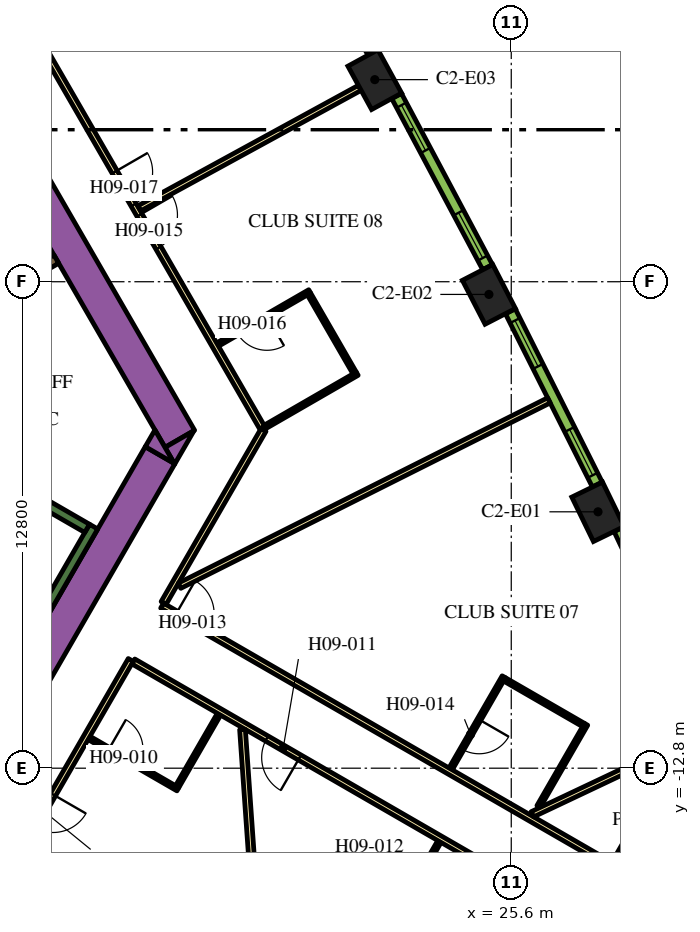
"""IFC4 building model, lengths in metres.
Left out: names, types, materials, properties, quantities, classifications, styles, units other than length and angle.
Written with IfcOpenShell. Run it as: python <this file> out.ifc"""

import sys

from ifc_helpers import new_model, si_unit, direction, frame, frame_2d, origin, origin_2d, place, context, subcontext, project, spatial, polyline, rectangle, outline, extrude, element, fill, save


model = new_model("IFC4")
c1 = context("Model", 3, precision=1e-05, world=origin(), true_north=direction((0.0, 1.0)))
c2 = subcontext(c1, "Body", "Model", "MODEL_VIEW")
j1 = project(units=[si_unit("LENGTHUNIT", "METRE"), si_unit("PLANEANGLEUNIT", "RADIAN")], contexts=[c1])
p1 = place(None, origin())
s1 = spatial("IfcSite", under=j1, at=p1, CompositionType="ELEMENT")
p2 = place(p1, origin())
s2 = spatial("IfcBuilding", under=s1, at=p2, CompositionType="ELEMENT")
p3 = place(p2, frame((0.0, 0.0, 118.8)))
s3 = spatial("IfcBuildingStorey", under=s2, at=p3, CompositionType="ELEMENT", Elevation=118.8)
p4 = place(p3, frame((29.097, -16.799, 0.0), z_axis=(0.0, 0.0, 1.0), x_axis=(0.866025403784, -0.5, 0.0)))
e1 = element("IfcColumn", 1, at=p4, inside=s3, PredefinedType="COLUMN", context=c2, shape_type="SweptSolid", body=[
    extrude(rectangle(XDim=3.0, YDim=3.0, at=origin_2d()), origin(), (0.0, 0.0, 1.0), 3.9),
])
for number, where, z_axis, x_axis in (
    (2, (27.883, -6.054, 0.0), (0.0, 0.0, 1.0), (-0.438, 0.899, 0.0)),
    (3, (25.012, -0.334, 0.0), (0.0, 0.0, 1.0), (-0.459, 0.888, 0.0)),
    (4, (22.009, 5.317, 0.0), (0.0, 0.0, 1.0), (-0.48, 0.877, 0.0)),
):
    element("IfcColumn", number, at=place(p3, frame(where, z_axis=z_axis, x_axis=x_axis)), inside=s3, PredefinedType="COLUMN", context=c2, shape_type="SweptSolid", body=[
        extrude(rectangle(XDim=1.3, YDim=0.9, at=origin_2d()), origin(), (0.0, 0.0, 1.0), 3.9),
    ])
p5 = place(p3, frame((6.776, 13.364, 0.0), z_axis=(0.0, 0.0, 1.0), x_axis=(0.500004177138, -0.8660229921, 0.0)))
e5 = element("IfcWall", 5, at=p5, inside=s3, PredefinedType="SOLIDWALL", context=c2, shape_type="SweptSolid", body=[
    extrude(rectangle(XDim=20.204, YDim=0.9, at=frame_2d((10.102, 0.0))), origin(), (0.0, 0.0, 1.0), 3.9),
])
p6 = place(p3, origin())
e6 = element("IfcWall", 6, at=p6, inside=s3, PredefinedType="SOLIDWALL", context=c2, shape_type="SweptSolid", body=[
    extrude(outline(polyline([(16.743, -4.8), (16.489, -4.36), (17.251, -3.92), (16.743, -4.8)])), origin(), (0.0, 0.0, 1.0), 3.9),
])
p7 = place(p3, frame((11.943, -12.214, 0.0), z_axis=(0.0, 0.0, 1.0), x_axis=(0.49998092645, 0.866036415623, 0.0)))
e7 = element("IfcWall", 7, at=p7, inside=s3, PredefinedType="SOLIDWALL", context=c2, shape_type="SweptSolid", body=[
    extrude(rectangle(XDim=8.83, YDim=0.9, at=frame_2d((4.415, 0.0))), origin(), (0.0, 0.0, 1.0), 3.9),
])
e8 = element("IfcWall", 8, at=p6, inside=s3, PredefinedType="SOLIDWALL", context=c2, shape_type="SweptSolid", body=[
    extrude(outline(polyline([(16.223, -3.9), (16.732, -4.78), (15.969, -4.34), (16.223, -3.9)])), origin(), (0.0, 0.0, 1.0), 3.9),
])
p8 = place(p3, frame((12.885, -9.431, 0.0), z_axis=(0.0, 0.0, 1.0), x_axis=(0.500020560727, 0.866013532718, 0.0)))
e9 = element("IfcWall", 9, at=p8, inside=s3, PredefinedType="SOLIDWALL", context=c2, shape_type="SweptSolid", body=[
    extrude(rectangle(XDim=3.45, YDim=0.25, at=frame_2d((1.725, 0.0))), origin(), (0.0, 0.0, 1.0), 3.9),
])
p9 = place(p3, frame((8.334, -2.964, 0.0), z_axis=(0.0, 0.0, 1.0), x_axis=(0.866016039709, -0.500016218704, 0.0)))
e10 = element("IfcWall", 10, at=p9, inside=s3, PredefinedType="SOLIDWALL", context=c2, shape_type="SweptSolid", body=[
    extrude(rectangle(XDim=7.05, YDim=0.25, at=frame_2d((3.525, 0.0))), origin(), (0.0, 0.0, 1.0), 3.9),
])
p10 = place(p3, frame((13.629, 0.594, 0.0), z_axis=(0.0, 0.0, 1.0), x_axis=(-0.86602790099, -0.499995674689, 0.0)))
e11 = element("IfcWall", 11, at=p10, inside=s3, PredefinedType="SOLIDWALL", context=c2, shape_type="SweptSolid", body=[
    extrude(rectangle(XDim=3.146, YDim=0.25, at=frame_2d((1.573, 0.0))), origin(), (0.0, 0.0, 1.0), 3.9),
])
p11 = place(p3, frame((16.412, -8.523, 0.0), z_axis=(0.0, 0.0, 1.0), x_axis=(0.866025629663, -0.499999608766, 0.0)))
e12 = element("IfcWall", 12, at=p11, inside=s3, PredefinedType="PARTITIONING", context=c2, shape_type="SweptSolid", body=[
    extrude(rectangle(XDim=13.624, YDim=0.15, at=frame_2d((6.812, 0.0))), origin(), (0.0, 0.0, 1.0), 2.75),
])
p12 = place(p11, frame((0.426, 0.0, 0.0)))
e13 = element("IfcOpeningElement", 13, at=p12, cuts=e12, PredefinedType="OPENING", context=c2, shape_type="SweptSolid", body=[
    extrude(rectangle(XDim=1.0, YDim=2.1, at=frame_2d((0.5, 1.05))), frame((0.0, 0.085, 0.0), z_axis=(0.0, -1.0, 0.0), x_axis=(1.0, 0.0, 0.0)), (0.0, 0.0, 1.0), 0.17),
])
p13 = place(p3, frame((19.081, -3.9, 0.0), z_axis=(0.0, 0.0, 1.0), x_axis=(-0.499974327079, -0.866040225545, 0.0)))
e14 = element("IfcWall", 14, at=p13, inside=s3, PredefinedType="PARTITIONING", context=c2, shape_type="SweptSolid", body=[
    extrude(rectangle(XDim=5.258, YDim=0.15, at=frame_2d((2.629, 0.0))), origin(), (0.0, 0.0, 1.0), 2.75),
])
p14 = place(p3, frame((6.163, 18.475, 0.0), z_axis=(0.0, 0.0, 1.0), x_axis=(0.500001317485, -0.866024643133, 0.0)))
e15 = element("IfcWall", 15, at=p14, inside=s3, PredefinedType="PARTITIONING", context=c2, shape_type="SweptSolid", body=[
    extrude(rectangle(XDim=25.767, YDim=0.15, at=frame_2d((12.883, 0.0))), origin(), (0.0, 0.0, 1.0), 2.75),
])
p15 = place(p14, frame((19.306, 0.0, 0.0)))
e16 = element("IfcOpeningElement", 16, at=p15, cuts=e15, PredefinedType="OPENING", context=c2, shape_type="SweptSolid", body=[
    extrude(rectangle(XDim=1.0, YDim=2.1, at=frame_2d((0.5, 1.05))), frame((0.0, 0.085, 0.0), z_axis=(0.0, -1.0, 0.0), x_axis=(1.0, 0.0, 0.0)), (0.0, 0.0, 1.0), 0.17),
])
p16 = place(p14, frame((17.999, 0.0, 0.0)))
e17 = element("IfcOpeningElement", 17, at=p16, cuts=e15, PredefinedType="OPENING", context=c2, shape_type="SweptSolid", body=[
    extrude(rectangle(XDim=1.0, YDim=2.1, at=frame_2d((0.5, 1.05))), frame((0.0, 0.085, 0.0), z_axis=(0.0, -1.0, 0.0), x_axis=(1.0, 0.0, 0.0)), (0.0, 0.0, 1.0), 0.17),
])
p17 = place(p14, frame((0.596, 0.0, 0.0)))
e18 = element("IfcOpeningElement", 18, at=p17, cuts=e15, PredefinedType="OPENING", context=c2, shape_type="SweptSolid", body=[
    extrude(rectangle(XDim=1.0, YDim=2.1, at=frame_2d((0.5, 1.05))), frame((0.0, 0.085, 0.0), z_axis=(0.0, -1.0, 0.0), x_axis=(1.0, 0.0, 0.0)), (0.0, 0.0, 1.0), 0.17),
])
p18 = place(p3, frame((15.587, -9.952, 0.0), z_axis=(0.0, 0.0, 1.0), x_axis=(-0.500016618951, -0.866015808616, 0.0)))
e19 = element("IfcWall", 19, at=p18, inside=s3, PredefinedType="PARTITIONING", context=c2, shape_type="SweptSolid", body=[
    extrude(rectangle(XDim=5.268, YDim=0.15, at=frame_2d((2.634, 0.0))), origin(), (0.0, 0.0, 1.0), 2.75),
])
p19 = place(p18, frame((4.088, 0.0, 0.0)))
e20 = element("IfcOpeningElement", 20, at=p19, cuts=e19, PredefinedType="OPENING", context=c2, shape_type="SweptSolid", body=[
    extrude(rectangle(XDim=1.0, YDim=2.1, at=frame_2d((0.5, 1.05))), frame((0.0, 0.085, 0.0), z_axis=(0.0, -1.0, 0.0), x_axis=(1.0, 0.0, 0.0)), (0.0, 0.0, 1.0), 0.17),
])
p20 = place(p3, frame((27.386, -16.764, 0.0), z_axis=(0.0, 0.0, 1.0), x_axis=(-0.866022585856, 0.500004880763, 0.0)))
e21 = element("IfcWall", 21, at=p20, inside=s3, PredefinedType="PARTITIONING", context=c2, shape_type="SweptSolid", body=[
    extrude(rectangle(XDim=13.544, YDim=0.15, at=frame_2d((6.772, 0.0))), origin(), (0.0, 0.0, 1.0), 2.75),
])
p21 = place(p20, frame((8.491, 0.0, 0.0)))
e22 = element("IfcOpeningElement", 22, at=p21, cuts=e21, PredefinedType="OPENING", context=c2, shape_type="SweptSolid", body=[
    extrude(rectangle(XDim=1.0, YDim=2.1, at=frame_2d((0.5, 1.05))), frame((0.0, 0.085, 0.0), z_axis=(0.0, -1.0, 0.0), x_axis=(1.0, 0.0, 0.0)), (0.0, 0.0, 1.0), 0.17),
])
p22 = place(p3, frame((21.614, 5.102, 0.0), z_axis=(0.0, 0.0, 1.0), x_axis=(-0.877484555087, -0.479604895287, 0.0)))
e23 = element("IfcWall", 23, at=p22, inside=s3, PredefinedType="PARTITIONING", context=c2, shape_type="SweptSolid", body=[
    extrude(rectangle(XDim=6.611, YDim=0.15, at=frame_2d((3.306, 0.0))), origin(), (0.0, 0.0, 1.0), 2.75),
])
p23 = place(p3, frame((26.591, -3.122, 0.0), z_axis=(0.0, 0.0, 1.0), x_axis=(-0.893766213273, -0.448533115847, 0.0)))
e24 = element("IfcWall", 24, at=p23, inside=s3, PredefinedType="PARTITIONING", context=c2, shape_type="SweptSolid", body=[
    extrude(rectangle(XDim=10.875, YDim=0.15, at=frame_2d((5.438, 0.0))), origin(), (0.0, 0.0, 1.0), 2.75),
])
p24 = place(p3, frame((19.153, -20.671, 0.0), z_axis=(0.0, 0.0, 1.0), x_axis=(-0.070070736723, 0.997542025107, 0.0)))
e25 = element("IfcWall", 25, at=p24, inside=s3, PredefinedType="PARTITIONING", context=c2, shape_type="SweptSolid", body=[
    extrude(rectangle(XDim=8.909, YDim=0.15, at=frame_2d((4.455, 0.0))), origin(), (0.0, 0.0, 1.0), 2.75),
])
p25 = place(p3, frame((30.231, -12.085, 0.0), z_axis=(0.0, 0.0, 1.0), x_axis=(-0.904001132572, -0.427530060122, 0.0)))
e26 = element("IfcWall", 26, at=p25, inside=s3, PredefinedType="PARTITIONING", context=c2, shape_type="SweptSolid", body=[
    extrude(rectangle(XDim=4.51, YDim=0.15, at=frame_2d((2.255, 0.0))), origin(), (0.0, 0.0, 1.0), 2.75),
])
p26 = place(p3, frame((14.49, -12.003, 0.0), z_axis=(0.0, 0.0, 1.0), x_axis=(0.866059108428, -0.4999416173, 0.0)))
e27 = element("IfcWall", 27, at=p26, inside=s3, PredefinedType="PARTITIONING", context=c2, shape_type="SweptSolid", body=[
    extrude(rectangle(XDim=2.7, YDim=0.1, at=frame_2d((1.35, 0.0))), origin(), (0.0, 0.0, 1.0), 2.75),
])
p27 = place(p26, frame((0.6, 0.0, 0.0)))
e28 = element("IfcOpeningElement", 28, at=p27, cuts=e27, PredefinedType="OPENING", context=c2, shape_type="SweptSolid", body=[
    extrude(rectangle(XDim=0.9, YDim=2.1, at=frame_2d((0.45, 1.05))), frame((0.0, 0.06, 0.0), z_axis=(0.0, -1.0, 0.0), x_axis=(1.0, 0.0, 0.0)), (0.0, 0.0, 1.0), 0.12),
])
p28 = place(p3, frame((16.81, -13.285, 0.0), z_axis=(0.0, 0.0, 1.0), x_axis=(0.499994660107, 0.866028486751, 0.0)))
e29 = element("IfcWall", 29, at=p28, inside=s3, PredefinedType="PARTITIONING", context=c2, shape_type="SweptSolid", body=[
    extrude(rectangle(XDim=2.2, YDim=0.1, at=frame_2d((1.1, 0.0))), origin(), (0.0, 0.0, 1.0), 2.75),
])
p29 = place(p3, frame((23.71, -14.728, 0.0), z_axis=(0.0, 0.0, 1.0), x_axis=(-0.500006934395, -0.866021400173, 0.0)))
e30 = element("IfcWall", 30, at=p29, inside=s3, PredefinedType="PARTITIONING", context=c2, shape_type="SweptSolid", body=[
    extrude(rectangle(XDim=2.6, YDim=0.1, at=frame_2d((1.3, 0.0))), origin(), (0.0, 0.0, 1.0), 2.75),
])
p30 = place(p29, frame((0.6, 0.0, 0.0)))
e31 = element("IfcOpeningElement", 31, at=p30, cuts=e30, PredefinedType="OPENING", context=c2, shape_type="SweptSolid", body=[
    extrude(rectangle(XDim=0.9, YDim=2.1, at=frame_2d((0.45, 1.05))), frame((0.0, 0.06, 0.0), z_axis=(0.0, -1.0, 0.0), x_axis=(1.0, 0.0, 0.0)), (0.0, 0.0, 1.0), 0.12),
])
p31 = place(p3, frame((25.404, -10.395, 0.0), z_axis=(0.0, 0.0, 1.0), x_axis=(-0.49998411664, -0.866034573852, 0.0)))
e32 = element("IfcWall", 32, at=p31, inside=s3, PredefinedType="PARTITIONING", context=c2, shape_type="SweptSolid", body=[
    extrude(rectangle(XDim=2.8, YDim=0.1, at=frame_2d((1.4, 0.0))), origin(), (0.0, 0.0, 1.0), 2.75),
])
p32 = place(p31, frame((1.3, 0.0, 0.0)))
e33 = element("IfcOpeningElement", 33, at=p32, cuts=e32, PredefinedType="OPENING", context=c2, shape_type="SweptSolid", body=[
    extrude(rectangle(XDim=0.9, YDim=2.1, at=frame_2d((0.45, 1.05))), frame((0.0, 0.06, 0.0), z_axis=(0.0, -1.0, 0.0), x_axis=(1.0, 0.0, 0.0)), (0.0, 0.0, 1.0), 0.12),
])
p33 = place(p3, frame((25.422, -10.463, 0.0), z_axis=(0.0, 0.0, 1.0), x_axis=(0.866024647952, -0.500001309137, 0.0)))
e34 = element("IfcWall", 34, at=p33, inside=s3, PredefinedType="PARTITIONING", context=c2, shape_type="SweptSolid", body=[
    extrude(rectangle(XDim=2.4, YDim=0.1, at=frame_2d((1.2, 0.0))), origin(), (0.0, 0.0, 1.0), 2.75),
])
p34 = place(p3, frame((26.319, -13.81, 0.0), z_axis=(0.0, 0.0, 1.0), x_axis=(0.500004234368, 0.866022959057, 0.0)))
e35 = element("IfcWall", 35, at=p34, inside=s3, PredefinedType="PARTITIONING", context=c2, shape_type="SweptSolid", body=[
    extrude(rectangle(XDim=2.5, YDim=0.1, at=frame_2d((1.25, 0.0))), origin(), (0.0, 0.0, 1.0), 2.75),
])
p35 = place(p3, frame((20.296, -0.254, 0.0), z_axis=(0.0, 0.0, 1.0), x_axis=(-0.866034573852, -0.49998411664, 0.0)))
e36 = element("IfcWall", 36, at=p35, inside=s3, PredefinedType="PARTITIONING", context=c2, shape_type="SweptSolid", body=[
    extrude(rectangle(XDim=2.8, YDim=0.1, at=frame_2d((1.4, 0.0))), origin(), (0.0, 0.0, 1.0), 2.75),
])
p36 = place(p35, frame((1.3, 0.0, 0.0)))
e37 = element("IfcOpeningElement", 37, at=p36, cuts=e36, PredefinedType="OPENING", context=c2, shape_type="SweptSolid", body=[
    extrude(rectangle(XDim=0.9, YDim=2.1, at=frame_2d((0.45, 1.05))), frame((0.0, 0.06, 0.0), z_axis=(0.0, -1.0, 0.0), x_axis=(1.0, 0.0, 0.0)), (0.0, 0.0, 1.0), 0.12),
])
p37 = place(p3, frame((20.278, -0.323, 0.0), z_axis=(0.0, 0.0, 1.0), x_axis=(0.500001309137, -0.866024647952, 0.0)))
e38 = element("IfcWall", 38, at=p37, inside=s3, PredefinedType="PARTITIONING", context=c2, shape_type="SweptSolid", body=[
    extrude(rectangle(XDim=2.4, YDim=0.1, at=frame_2d((1.2, 0.0))), origin(), (0.0, 0.0, 1.0), 2.75),
])
p38 = place(p3, frame((19.121, -3.819, 0.0), z_axis=(0.0, 0.0, 1.0), x_axis=(0.866034573852, 0.49998411664, 0.0)))
e39 = element("IfcWall", 39, at=p38, inside=s3, PredefinedType="PARTITIONING", context=c2, shape_type="SweptSolid", body=[
    extrude(rectangle(XDim=2.8, YDim=0.1, at=frame_2d((1.4, 0.0))), origin(), (0.0, 0.0, 1.0), 2.75),
])
p39 = place(p3, frame((30.62, -11.127, 0.0), z_axis=(0.0, 0.0, 1.0), x_axis=(-0.427543726596, 0.903994669148, 0.0)))
e40 = element("IfcWall", 40, at=p39, inside=s3, PredefinedType="SOLIDWALL", context=c2, shape_type="SweptSolid", body=[
    extrude(rectangle(XDim=5.107, YDim=0.29, at=frame_2d((2.553, 0.0))), origin(), (0.0, 0.0, 1.0), 3.65),
])
p40 = place(p39, frame((0.24, 0.0, 0.9)))
e41 = element("IfcOpeningElement", 41, at=p40, cuts=e40, PredefinedType="OPENING", context=c2, shape_type="SweptSolid", body=[
    extrude(rectangle(XDim=1.35, YDim=2.15, at=frame_2d((0.675, 1.075))), frame((0.0, 0.155, 0.0), z_axis=(0.0, -1.0, 0.0), x_axis=(1.0, 0.0, 0.0)), (0.0, 0.0, 1.0), 0.31),
])
p41 = place(p39, frame((3.471, 0.0, 0.9)))
e42 = element("IfcOpeningElement", 42, at=p41, cuts=e40, PredefinedType="OPENING", context=c2, shape_type="SweptSolid", body=[
    extrude(rectangle(XDim=1.35, YDim=2.15, at=frame_2d((0.675, 1.075))), frame((0.0, 0.155, 0.0), z_axis=(0.0, -1.0, 0.0), x_axis=(1.0, 0.0, 0.0)), (0.0, 0.0, 1.0), 0.31),
])
p42 = place(p3, frame((27.864, -5.336, 0.0), z_axis=(0.0, 0.0, 1.0), x_axis=(-0.448534297211, 0.893765620409, 0.0)))
e43 = element("IfcWall", 43, at=p42, inside=s3, PredefinedType="SOLIDWALL", context=c2, shape_type="SweptSolid", body=[
    extrude(rectangle(XDim=5.1, YDim=0.29, at=frame_2d((2.55, 0.0))), origin(), (0.0, 0.0, 1.0), 3.65),
])
p43 = place(p42, frame((0.272, 0.0, 0.9)))
e44 = element("IfcOpeningElement", 44, at=p43, cuts=e43, PredefinedType="OPENING", context=c2, shape_type="SweptSolid", body=[
    extrude(rectangle(XDim=1.35, YDim=2.15, at=frame_2d((0.675, 1.075))), frame((0.0, 0.155, 0.0), z_axis=(0.0, -1.0, 0.0), x_axis=(1.0, 0.0, 0.0)), (0.0, 0.0, 1.0), 0.31),
])
p44 = place(p42, frame((3.478, 0.0, 0.9)))
e45 = element("IfcOpeningElement", 45, at=p44, cuts=e43, PredefinedType="OPENING", context=c2, shape_type="SweptSolid", body=[
    extrude(rectangle(XDim=1.35, YDim=2.15, at=frame_2d((0.675, 1.075))), frame((0.0, 0.155, 0.0), z_axis=(0.0, -1.0, 0.0), x_axis=(1.0, 0.0, 0.0)), (0.0, 0.0, 1.0), 0.31),
])
p45 = place(p3, frame((24.977, 0.383, 0.0), z_axis=(0.0, 0.0, 1.0), x_axis=(-0.469323203119, 0.883026461106, 0.0)))
e46 = element("IfcWall", 46, at=p45, inside=s3, PredefinedType="SOLIDWALL", context=c2, shape_type="SweptSolid", body=[
    extrude(rectangle(XDim=5.101, YDim=0.29, at=frame_2d((2.55, 0.0))), origin(), (0.0, 0.0, 1.0), 3.65),
])
p46 = place(p45, frame((0.273, 0.0, 0.9)))
e47 = element("IfcOpeningElement", 47, at=p46, cuts=e46, PredefinedType="OPENING", context=c2, shape_type="SweptSolid", body=[
    extrude(rectangle(XDim=1.35, YDim=2.15, at=frame_2d((0.675, 1.075))), frame((0.0, 0.155, 0.0), z_axis=(0.0, -1.0, 0.0), x_axis=(1.0, 0.0, 0.0)), (0.0, 0.0, 1.0), 0.31),
])
p47 = place(p45, frame((3.478, 0.0, 0.9)))
e48 = element("IfcOpeningElement", 48, at=p47, cuts=e46, PredefinedType="OPENING", context=c2, shape_type="SweptSolid", body=[
    extrude(rectangle(XDim=1.35, YDim=2.15, at=frame_2d((0.675, 1.075))), frame((0.0, 0.155, 0.0), z_axis=(0.0, -1.0, 0.0), x_axis=(1.0, 0.0, 0.0)), (0.0, 0.0, 1.0), 0.31),
])
p48 = place(p3, frame((21.956, 6.033, 0.0), z_axis=(0.0, 0.0, 1.0), x_axis=(-0.48983164787, 0.87181704316, 0.0)))
e49 = element("IfcWall", 49, at=p48, inside=s3, PredefinedType="SOLIDWALL", context=c2, shape_type="SweptSolid", body=[
    extrude(rectangle(XDim=5.1, YDim=0.29, at=frame_2d((2.55, 0.0))), origin(), (0.0, 0.0, 1.0), 3.65),
])
p49 = place(p48, frame((0.273, 0.0, 0.9)))
e50 = element("IfcOpeningElement", 50, at=p49, cuts=e49, PredefinedType="OPENING", context=c2, shape_type="SweptSolid", body=[
    extrude(rectangle(XDim=1.35, YDim=2.15, at=frame_2d((0.675, 1.075))), frame((0.0, 0.155, 0.0), z_axis=(0.0, -1.0, 0.0), x_axis=(1.0, 0.0, 0.0)), (0.0, 0.0, 1.0), 0.31),
])
p50 = place(p48, frame((3.478, 0.0, 0.9)))
e51 = element("IfcOpeningElement", 51, at=p50, cuts=e49, PredefinedType="OPENING", context=c2, shape_type="SweptSolid", body=[
    extrude(rectangle(XDim=1.35, YDim=2.15, at=frame_2d((0.675, 1.075))), frame((0.0, 0.155, 0.0), z_axis=(0.0, -1.0, 0.0), x_axis=(1.0, 0.0, 0.0)), (0.0, 0.0, 1.0), 0.31),
])
p51 = place(p19, origin())
e52 = element("IfcDoor", 52, at=p51, inside=s3, OperationType="SINGLE_SWING_RIGHT", PredefinedType="DOOR", context=c2, shape_type="SweptSolid", body=[
    extrude(rectangle(XDim=1.0, YDim=2.1, at=frame_2d((0.5, 1.05))), frame((0.0, 0.025, 0.0), z_axis=(0.0, -1.0, 0.0), x_axis=(1.0, 0.0, 0.0)), (0.0, 0.0, 1.0), 0.05),
])
fill(e20, e52)
p52 = place(p27, origin())
e53 = element("IfcDoor", 53, at=p52, inside=s3, OperationType="SINGLE_SWING_LEFT", PredefinedType="DOOR", context=c2, shape_type="SweptSolid", body=[
    extrude(rectangle(XDim=0.9, YDim=2.1, at=frame_2d((0.45, 1.05))), frame((0.0, 0.025, 0.0), z_axis=(0.0, -1.0, 0.0), x_axis=(1.0, 0.0, 0.0)), (0.0, 0.0, 1.0), 0.05),
])
fill(e28, e53)
p53 = place(p21, origin())
e54 = element("IfcDoor", 54, at=p53, inside=s3, OperationType="SINGLE_SWING_RIGHT", PredefinedType="DOOR", context=c2, shape_type="SweptSolid", body=[
    extrude(rectangle(XDim=1.0, YDim=2.1, at=frame_2d((0.5, 1.05))), frame((0.0, 0.025, 0.0), z_axis=(0.0, -1.0, 0.0), x_axis=(1.0, 0.0, 0.0)), (0.0, 0.0, 1.0), 0.05),
])
fill(e22, e54)
p54 = place(p12, origin())
e55 = element("IfcDoor", 55, at=p54, inside=s3, OperationType="SINGLE_SWING_LEFT", PredefinedType="DOOR", context=c2, shape_type="SweptSolid", body=[
    extrude(rectangle(XDim=1.0, YDim=2.1, at=frame_2d((0.5, 1.05))), frame((0.0, 0.025, 0.0), z_axis=(0.0, -1.0, 0.0), x_axis=(1.0, 0.0, 0.0)), (0.0, 0.0, 1.0), 0.05),
])
fill(e13, e55)
p55 = place(p32, origin())
e56 = element("IfcDoor", 56, at=p55, inside=s3, OperationType="SINGLE_SWING_LEFT", PredefinedType="DOOR", context=c2, shape_type="SweptSolid", body=[
    extrude(rectangle(XDim=0.9, YDim=2.1, at=frame_2d((0.45, 1.05))), frame((0.0, 0.025, 0.0), z_axis=(0.0, -1.0, 0.0), x_axis=(1.0, 0.0, 0.0)), (0.0, 0.0, 1.0), 0.05),
])
fill(e33, e56)
p56 = place(p15, origin())
e57 = element("IfcDoor", 57, at=p56, inside=s3, OperationType="SINGLE_SWING_LEFT", PredefinedType="DOOR", context=c2, shape_type="SweptSolid", body=[
    extrude(rectangle(XDim=1.0, YDim=2.1, at=frame_2d((0.5, 1.05))), frame((0.0, 0.025, 0.0), z_axis=(0.0, -1.0, 0.0), x_axis=(1.0, 0.0, 0.0)), (0.0, 0.0, 1.0), 0.05),
])
fill(e16, e57)
p57 = place(p36, origin())
e58 = element("IfcDoor", 58, at=p57, inside=s3, OperationType="SINGLE_SWING_LEFT", PredefinedType="DOOR", context=c2, shape_type="SweptSolid", body=[
    extrude(rectangle(XDim=0.9, YDim=2.1, at=frame_2d((0.45, 1.05))), frame((0.0, 0.025, 0.0), z_axis=(0.0, -1.0, 0.0), x_axis=(1.0, 0.0, 0.0)), (0.0, 0.0, 1.0), 0.05),
])
fill(e37, e58)
p58 = place(p16, origin())
e59 = element("IfcDoor", 59, at=p58, inside=s3, OperationType="SINGLE_SWING_RIGHT", PredefinedType="DOOR", context=c2, shape_type="SweptSolid", body=[
    extrude(rectangle(XDim=1.0, YDim=2.1, at=frame_2d((0.5, 1.05))), frame((0.0, 0.025, 0.0), z_axis=(0.0, -1.0, 0.0), x_axis=(1.0, 0.0, 0.0)), (0.0, 0.0, 1.0), 0.05),
])
fill(e17, e59)
p59 = place(p43, origin())
e60 = element("IfcWindow", 60, at=p59, inside=s3, PartitioningType="DOUBLE_PANEL_VERTICAL", PredefinedType="WINDOW", context=c2, shape_type="SweptSolid", body=[
    extrude(rectangle(XDim=1.35, YDim=2.15, at=frame_2d((0.675, 1.075))), frame((0.0, 0.015, 0.0), z_axis=(0.0, -1.0, 0.0), x_axis=(1.0, 0.0, 0.0)), (0.0, 0.0, 1.0), 0.06),
])
fill(e44, e60)
p60 = place(p44, origin())
e61 = element("IfcWindow", 61, at=p60, inside=s3, PartitioningType="DOUBLE_PANEL_VERTICAL", PredefinedType="WINDOW", context=c2, shape_type="SweptSolid", body=[
    extrude(rectangle(XDim=1.35, YDim=2.15, at=frame_2d((0.675, 1.075))), frame((0.0, 0.015, 0.0), z_axis=(0.0, -1.0, 0.0), x_axis=(1.0, 0.0, 0.0)), (0.0, 0.0, 1.0), 0.06),
])
fill(e45, e61)
p61 = place(p46, origin())
e62 = element("IfcWindow", 62, at=p61, inside=s3, PartitioningType="DOUBLE_PANEL_VERTICAL", PredefinedType="WINDOW", context=c2, shape_type="SweptSolid", body=[
    extrude(rectangle(XDim=1.35, YDim=2.15, at=frame_2d((0.675, 1.075))), frame((0.0, 0.015, 0.0), z_axis=(0.0, -1.0, 0.0), x_axis=(1.0, 0.0, 0.0)), (0.0, 0.0, 1.0), 0.06),
])
fill(e47, e62)
p62 = place(p47, origin())
e63 = element("IfcWindow", 63, at=p62, inside=s3, PartitioningType="DOUBLE_PANEL_VERTICAL", PredefinedType="WINDOW", context=c2, shape_type="SweptSolid", body=[
    extrude(rectangle(XDim=1.35, YDim=2.15, at=frame_2d((0.675, 1.075))), frame((0.0, 0.015, 0.0), z_axis=(0.0, -1.0, 0.0), x_axis=(1.0, 0.0, 0.0)), (0.0, 0.0, 1.0), 0.06),
])
fill(e48, e63)
save(model, sys.argv[1])
